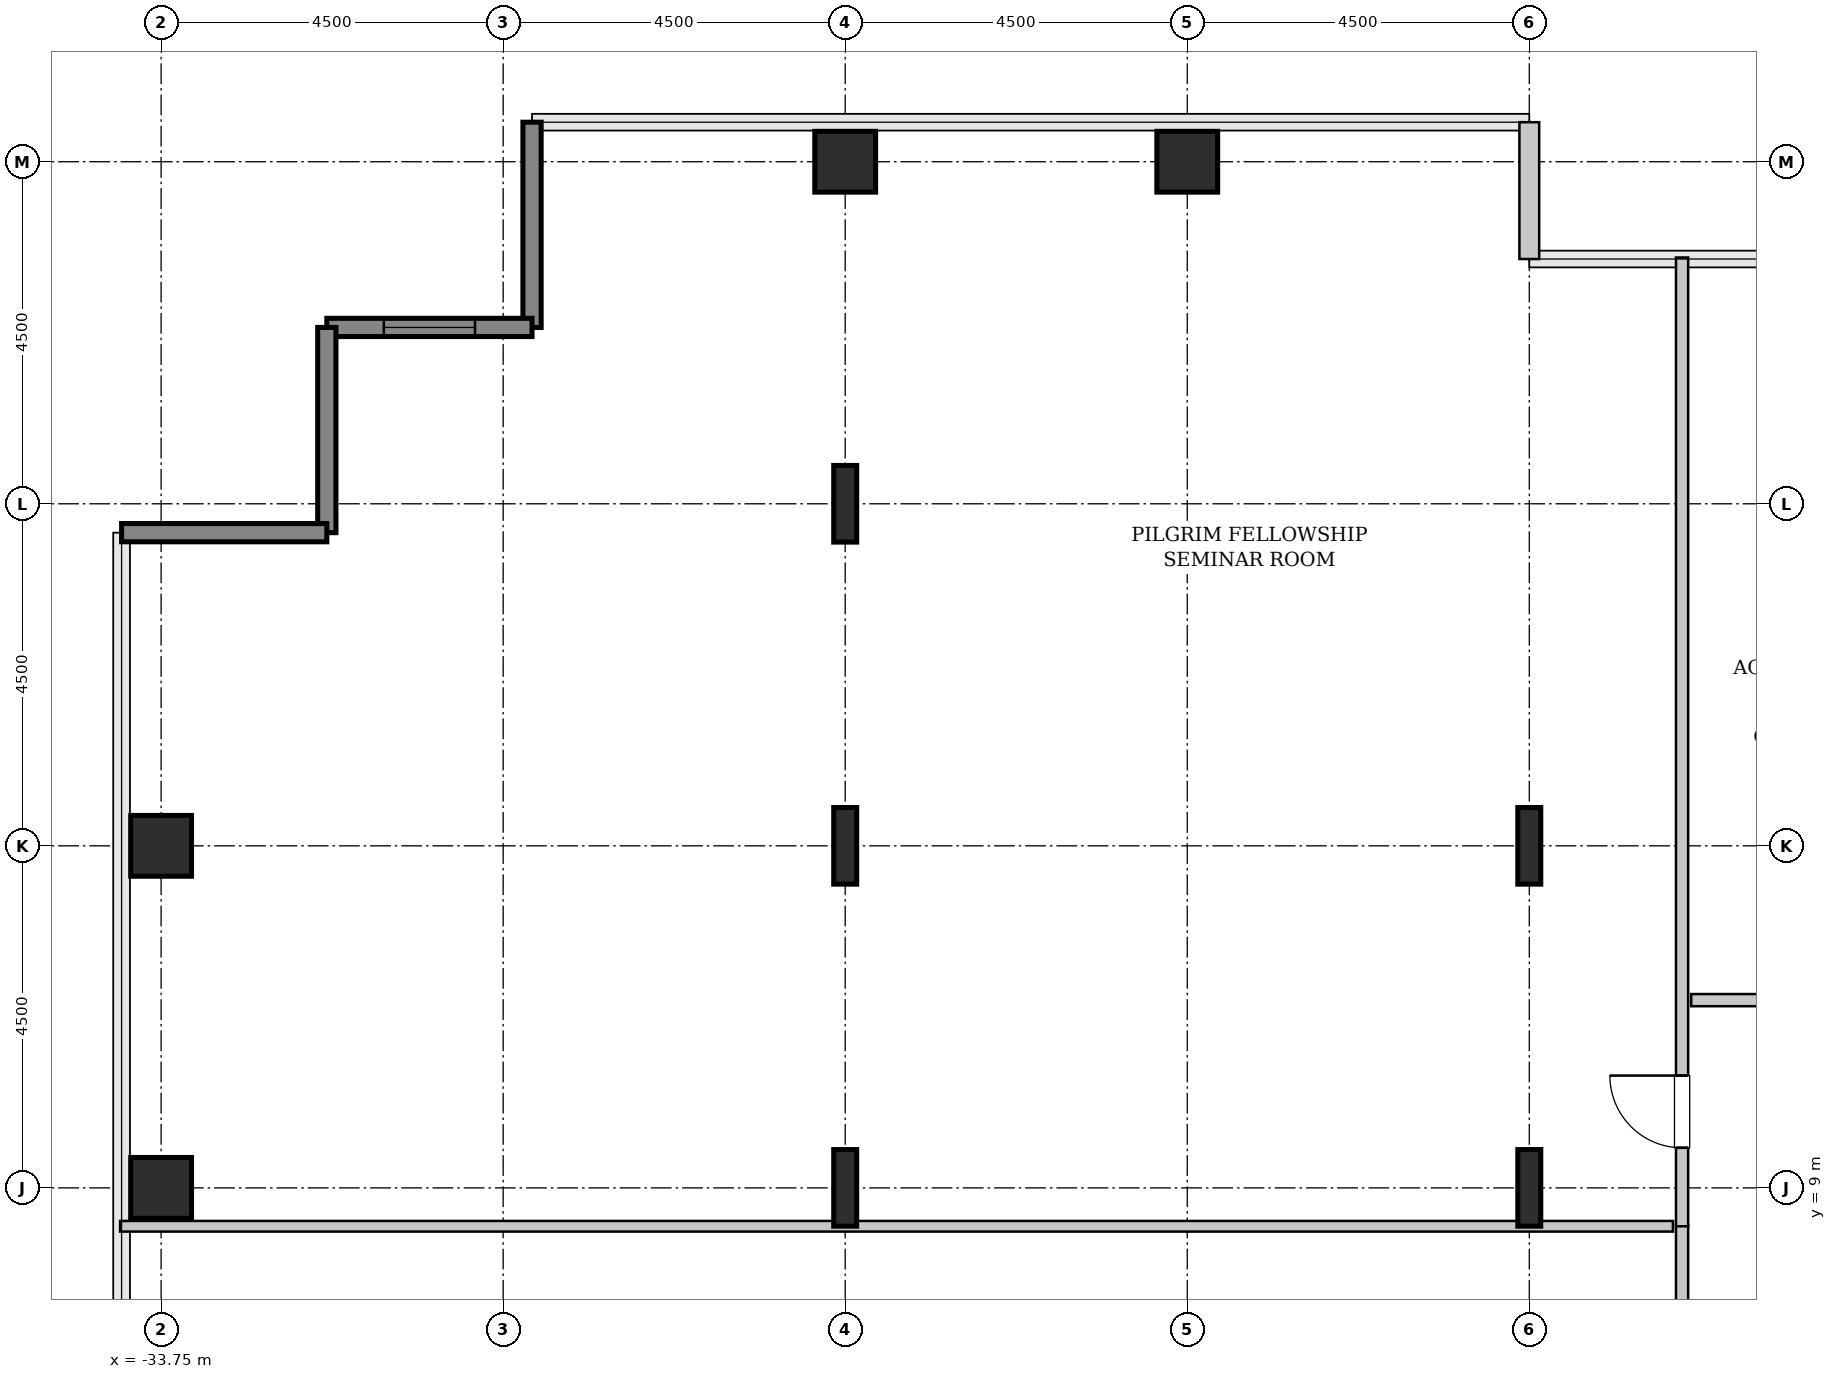
"""IFC4 building model, lengths in metres.
Left out: names, types, materials, properties, quantities, classifications, styles, units other than length and angle.
Written with IfcOpenShell. Run it as: python <this file> out.ifc"""

import sys

from ifc_helpers import new_model, si_unit, direction, frame, frame_2d, origin, origin_2d, place, context, subcontext, project, spatial, rectangle, hollow_rectangle, i_section, extrude, source, transform, mapped, element, fill, save


model = new_model("IFC4")
c1 = context("Model", 3, precision=1e-05, world=origin(), true_north=direction((0.0, 1.0)))
c2 = subcontext(c1, "Body", "Model", "MODEL_VIEW")
j1 = project(units=[si_unit("LENGTHUNIT", "METRE"), si_unit("PLANEANGLEUNIT", "RADIAN")], contexts=[c1])
p1 = place(None, origin())
s1 = spatial("IfcSite", under=j1, at=p1, CompositionType="ELEMENT")
p2 = place(p1, origin())
s2 = spatial("IfcBuilding", under=s1, at=p2, CompositionType="ELEMENT")
p3 = place(p2, frame((0.0, 0.0, 121.2)))
s3 = spatial("IfcBuildingStorey", under=s2, at=p3, CompositionType="ELEMENT", Elevation=121.2)
m1 = source(origin(), c2, "Body", "SweptSolid", [
    extrude(hollow_rectangle(XDim=0.8, YDim=0.8, WallThickness=0.04, InnerFilletRadius=0.04, OuterFilletRadius=0.08, at=origin_2d()), origin(), (0.0, 0.0, 1.0), 3.8),
])
for number, where, z_axis, x_axis in (
    (1, (-33.75, 9.0, 0.0), (0.0, 0.0, 1.0), (1.0, 0.0, 0.0)),
    (2, (-33.75, 13.5, 0.0), (0.0, 0.0, 1.0), (1.0, 0.0, 0.0)),
):
    element("IfcColumn", number, at=place(p3, frame(where, z_axis=z_axis, x_axis=x_axis)), inside=s3, PredefinedType="COLUMN", context=c2, shape_type="MappedRepresentation", body=[
        mapped(m1, transform((0.0, 0.0, 0.0), x_axis=(1.0, 0.0, 0.0), y_axis=(0.0, 1.0, 0.0), z_axis=(0.0, 0.0, 1.0), scale=1.0)),
    ])
m2 = source(origin(), c2, "Body", "SweptSolid", [
    extrude(i_section(OverallWidth=0.302, OverallDepth=1.008, WebThickness=0.021, FlangeThickness=0.04, FilletRadius=0.03, at=origin_2d()), origin(), (0.0, 0.0, 1.0), 3.8),
])
for number, where, z_axis, x_axis in (
    (3, (-24.75, 9.0, 0.0), (0.0, 0.0, 1.0), (1.0, 0.0, 0.0)),
    (4, (-24.75, 13.5, 0.0), (0.0, 0.0, 1.0), (1.0, 0.0, 0.0)),
    (5, (-24.75, 18.0, 0.0), (0.0, 0.0, 1.0), (1.0, 0.0, 0.0)),
):
    element("IfcColumn", number, at=place(p3, frame(where, z_axis=z_axis, x_axis=x_axis)), inside=s3, PredefinedType="COLUMN", context=c2, shape_type="MappedRepresentation", body=[
        mapped(m2, transform((0.0, 0.0, 0.0), x_axis=(1.0, 0.0, 0.0), y_axis=(0.0, 1.0, 0.0), z_axis=(0.0, 0.0, 1.0), scale=1.0)),
    ])
for number, where, z_axis, x_axis in (
    (6, (-24.75, 22.5, 0.0), (0.0, 0.0, 1.0), (1.0, 0.0, 0.0)),
    (7, (-20.25, 22.5, 0.0), (0.0, 0.0, 1.0), (1.0, 0.0, 0.0)),
):
    element("IfcColumn", number, at=place(p3, frame(where, z_axis=z_axis, x_axis=x_axis)), inside=s3, PredefinedType="COLUMN", context=c2, shape_type="MappedRepresentation", body=[
        mapped(m1, transform((0.0, 0.0, 0.0), x_axis=(1.0, 0.0, 0.0), y_axis=(0.0, 1.0, 0.0), z_axis=(0.0, 0.0, 1.0), scale=1.0)),
    ])
for number, where, z_axis, x_axis in (
    (8, (-15.75, 9.0, 0.0), (0.0, 0.0, 1.0), (1.0, 0.0, 0.0)),
    (9, (-15.75, 13.5, 0.0), (0.0, 0.0, 1.0), (1.0, 0.0, 0.0)),
):
    element("IfcColumn", number, at=place(p3, frame(where, z_axis=z_axis, x_axis=x_axis)), inside=s3, PredefinedType="COLUMN", context=c2, shape_type="MappedRepresentation", body=[
        mapped(m2, transform((0.0, 0.0, 0.0), x_axis=(1.0, 0.0, 0.0), y_axis=(0.0, 1.0, 0.0), z_axis=(0.0, 0.0, 1.0), scale=1.0)),
    ])
m3 = source(origin(), c2, "Body", "SweptSolid", [
    extrude(rectangle(XDim=1.8, YDim=0.26, at=frame_2d((0.9, 0.0))), origin(), (0.0, 0.0, 1.0), 3.55),
])
p4 = place(p3, frame((-15.75, 21.22, 0.0), z_axis=(0.0, 0.0, 1.0), x_axis=(0.0, 1.0, 0.0)))
e10 = element("IfcWall", 10, at=p4, inside=s3, PredefinedType="SOLIDWALL", context=c2, shape_type="MappedRepresentation", body=[
    mapped(m3, transform((0.0, 0.0, 0.0), x_axis=(1.0, 0.0, 0.0), y_axis=(0.0, 1.0, 0.0), z_axis=(0.0, 0.0, 1.0), scale=1.0)),
])
m4 = source(origin(), c2, "Body", "SweptSolid", [
    extrude(rectangle(XDim=2.7, YDim=0.24, at=frame_2d((1.35, 0.0))), origin(), (0.0, 0.0, 1.0), 3.55),
])
p5 = place(p3, frame((-28.87, 23.02, 0.0), z_axis=(0.0, 0.0, 1.0), x_axis=(0.0, -1.0, 0.0)))
e11 = element("IfcWall", 11, at=p5, inside=s3, PredefinedType="SHEAR", context=c2, shape_type="MappedRepresentation", body=[
    mapped(m4, transform((0.0, 0.0, 0.0), x_axis=(1.0, 0.0, 0.0), y_axis=(0.0, 1.0, 0.0), z_axis=(0.0, 0.0, 1.0), scale=1.0)),
])
p6 = place(p3, frame((-28.87, 20.32, 0.0), z_axis=(0.0, 0.0, 1.0), x_axis=(-1.0, 0.0, 0.0)))
e12 = element("IfcWall", 12, at=p6, inside=s3, PredefinedType="SHEAR", context=c2, shape_type="MappedRepresentation", body=[
    mapped(m4, transform((0.0, 0.0, 0.0), x_axis=(1.0, 0.0, 0.0), y_axis=(0.0, 1.0, 0.0), z_axis=(0.0, 0.0, 1.0), scale=1.0)),
])
p7 = place(p6, frame((0.75, 0.0, 0.85)))
e13 = element("IfcOpeningElement", 13, at=p7, cuts=e12, PredefinedType="OPENING", context=c2, shape_type="SweptSolid", body=[
    extrude(rectangle(XDim=1.2, YDim=1.8, at=frame_2d((0.6, 0.9))), frame((0.0, 0.13, 0.0), z_axis=(0.0, -1.0, 0.0), x_axis=(1.0, 0.0, 0.0)), (0.0, 0.0, 1.0), 0.26),
])
for number, where, z_axis, x_axis in (
    (14, (-31.57, 20.32, 0.0), (0.0, 0.0, 1.0), (0.0, -1.0, 0.0)),
    (15, (-31.57, 17.62, 0.0), (0.0, 0.0, 1.0), (-1.0, 0.0, 0.0)),
):
    element("IfcWall", number, at=place(p3, frame(where, z_axis=z_axis, x_axis=x_axis)), inside=s3, PredefinedType="SHEAR", context=c2, shape_type="MappedRepresentation", body=[
        mapped(m4, transform((0.0, 0.0, 0.0), x_axis=(1.0, 0.0, 0.0), y_axis=(0.0, 1.0, 0.0), z_axis=(0.0, 0.0, 1.0), scale=1.0)),
    ])
m5 = source(origin(), c2, "Body", "SweptSolid", [
    extrude(rectangle(XDim=3.41, YDim=0.16, at=frame_2d((1.705, 0.0))), origin(), (0.0, 0.0, 1.0), 3.535),
])
p8 = place(p3, frame((-13.74, 5.095, 0.0), z_axis=(0.0, 0.0, 1.0), x_axis=(0.0, 1.0, 0.0)))
e16 = element("IfcWall", 16, at=p8, inside=s3, PredefinedType="PARTITIONING", context=c2, shape_type="MappedRepresentation", body=[
    mapped(m5, transform((0.0, 0.0, 0.0), x_axis=(1.0, 0.0, 0.0), y_axis=(0.0, 1.0, 0.0), z_axis=(0.0, 0.0, 1.0), scale=1.0)),
])
p9 = place(p8, frame((1.23, 0.0, 0.0)))
e17 = element("IfcOpeningElement", 17, at=p9, cuts=e16, PredefinedType="OPENING", context=c2, shape_type="SweptSolid", body=[
    extrude(rectangle(XDim=0.95, YDim=2.1, at=frame_2d((0.475, 1.05))), frame((0.0, 0.09, 0.0), z_axis=(0.0, -1.0, 0.0), x_axis=(1.0, 0.0, 0.0)), (0.0, 0.0, 1.0), 0.18),
])
m6 = source(origin(), c2, "Body", "SweptSolid", [
    extrude(rectangle(XDim=20.43, YDim=0.14, at=frame_2d((10.215, 0.0))), origin(), (0.0, 0.0, 1.0), 2.875),
])
p10 = place(p3, frame((-34.29, 8.495, 0.0), z_axis=(0.0, 0.0, 1.0), x_axis=(1.0, 0.0, 0.0)))
e18 = element("IfcWall", 18, at=p10, inside=s3, PredefinedType="PARTITIONING", context=c2, shape_type="MappedRepresentation", body=[
    mapped(m6, transform((0.0, 0.0, 0.0), x_axis=(1.0, 0.0, 0.0), y_axis=(0.0, 1.0, 0.0), z_axis=(0.0, 0.0, 1.0), scale=1.0)),
])
m7 = source(origin(), c2, "Body", "SweptSolid", [
    extrude(rectangle(XDim=12.745, YDim=0.16, at=frame_2d((6.373, 0.0))), origin(), (0.0, 0.0, 1.0), 3.535),
])
p11 = place(p3, frame((-13.74, 8.495, 0.0), z_axis=(0.0, 0.0, 1.0), x_axis=(0.0, 1.0, 0.0)))
e19 = element("IfcWall", 19, at=p11, inside=s3, PredefinedType="PARTITIONING", context=c2, shape_type="MappedRepresentation", body=[
    mapped(m7, transform((0.0, 0.0, 0.0), x_axis=(1.0, 0.0, 0.0), y_axis=(0.0, 1.0, 0.0), z_axis=(0.0, 0.0, 1.0), scale=1.0)),
])
p12 = place(p11, frame((1.032, 0.0, 0.0)))
e20 = element("IfcOpeningElement", 20, at=p12, cuts=e19, PredefinedType="OPENING", context=c2, shape_type="SweptSolid", body=[
    extrude(rectangle(XDim=0.95, YDim=2.1, at=frame_2d((0.475, 1.05))), frame((0.0, 0.09, 0.0), z_axis=(0.0, -1.0, 0.0), x_axis=(1.0, 0.0, 0.0)), (0.0, 0.0, 1.0), 0.18),
])
m8 = source(origin(), c2, "Body", "SweptSolid", [
    extrude(rectangle(XDim=4.125, YDim=0.16, at=frame_2d((2.062, 0.0))), origin(), (0.0, 0.0, 1.0), 3.535),
])
p13 = place(p3, frame((-13.62, 11.47, 0.0), z_axis=(0.0, 0.0, 1.0), x_axis=(1.0, 0.0, 0.0)))
e21 = element("IfcWall", 21, at=p13, inside=s3, PredefinedType="PARTITIONING", context=c2, shape_type="MappedRepresentation", body=[
    mapped(m8, transform((0.0, 0.0, 0.0), x_axis=(1.0, 0.0, 0.0), y_axis=(0.0, 1.0, 0.0), z_axis=(0.0, 0.0, 1.0), scale=1.0)),
])
p14 = place(p13, frame((1.587, 0.0, 0.0)))
e22 = element("IfcOpeningElement", 22, at=p14, cuts=e21, PredefinedType="OPENING", context=c2, shape_type="SweptSolid", body=[
    extrude(rectangle(XDim=0.95, YDim=2.1, at=frame_2d((0.475, 1.05))), frame((0.0, 0.09, 0.0), z_axis=(0.0, -1.0, 0.0), x_axis=(1.0, 0.0, 0.0)), (0.0, 0.0, 1.0), 0.18),
])
m9 = source(origin(), c2, "Body", "SweptSolid", [
    extrude(rectangle(XDim=1.2, YDim=1.8, at=frame_2d((0.6, 0.9))), frame((0.0, 0.03, 0.0), z_axis=(0.0, -1.0, 0.0), x_axis=(1.0, 0.0, 0.0)), (0.0, 0.0, 1.0), 0.06),
])
p15 = place(p7, origin())
e23 = element("IfcWindow", 23, at=p15, inside=s3, PartitioningType="SINGLE_PANEL", PredefinedType="WINDOW", context=c2, shape_type="MappedRepresentation", body=[
    mapped(m9, transform((0.0, 0.0, 0.0), x_axis=(1.0, 0.0, 0.0), y_axis=(0.0, 1.0, 0.0), z_axis=(0.0, 0.0, 1.0), scale=1.0)),
])
fill(e13, e23)
m10 = source(origin(), c2, "Body", "SweptSolid", [
    extrude(rectangle(XDim=0.95, YDim=2.1, at=frame_2d((0.475, 1.05))), frame((0.0, 0.025, 0.0), z_axis=(0.0, -1.0, 0.0), x_axis=(1.0, 0.0, 0.0)), (0.0, 0.0, 1.0), 0.05),
])
p16 = place(p12, origin())
e24 = element("IfcDoor", 24, at=p16, inside=s3, OperationType="SINGLE_SWING_RIGHT", PredefinedType="DOOR", context=c2, shape_type="MappedRepresentation", body=[
    mapped(m10, transform((0.0, 0.0, 0.0), x_axis=(1.0, 0.0, 0.0), y_axis=(0.0, 1.0, 0.0), z_axis=(0.0, 0.0, 1.0), scale=1.0)),
])
fill(e20, e24)
save(model, sys.argv[1])
